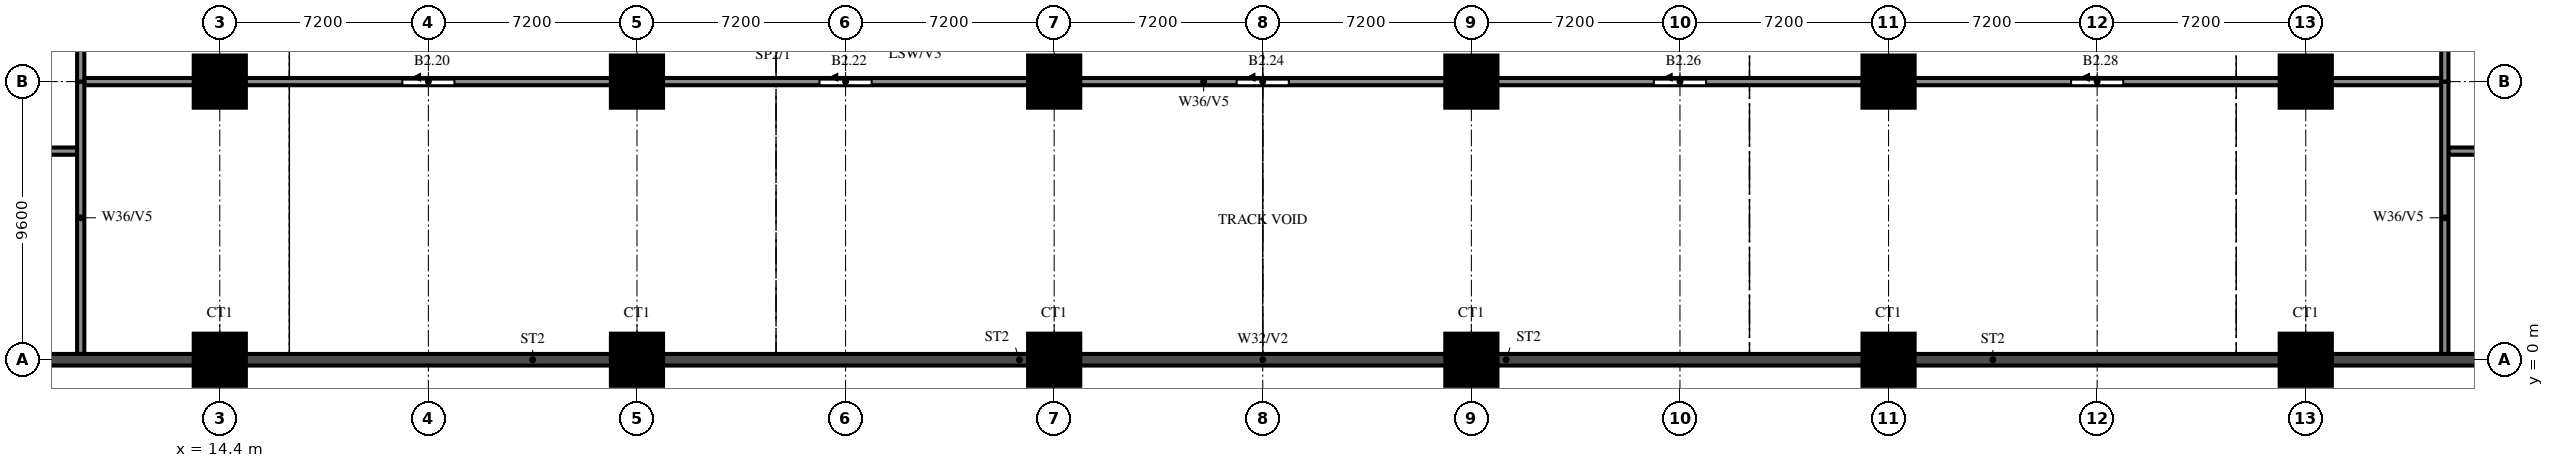
"""IFC4 building model, lengths in metres.
Left out: names, types, materials, properties, quantities, classifications, styles, units other than length and angle.
Written with IfcOpenShell. Run it as: python <this file> out.ifc"""

import sys

from ifc_helpers import new_model, si_unit, direction, frame, frame_2d, origin, origin_2d, place, context, subcontext, project, spatial, rectangle, extrude, source, transform, mapped, element, fill, save


model = new_model("IFC4")
c1 = context("Model", 3, precision=1e-05, world=origin(), true_north=direction((0.0, 1.0)))
c2 = subcontext(c1, "Body", "Model", "MODEL_VIEW")
j1 = project(units=[si_unit("LENGTHUNIT", "METRE"), si_unit("PLANEANGLEUNIT", "RADIAN")], contexts=[c1])
p1 = place(None, origin())
s1 = spatial("IfcSite", under=j1, at=p1, CompositionType="ELEMENT")
p2 = place(p1, origin())
s2 = spatial("IfcBuilding", under=s1, at=p2, CompositionType="ELEMENT")
p3 = place(p2, frame((0.0, 0.0, -11.4)))
s3 = spatial("IfcBuildingStorey", under=s2, at=p3, CompositionType="ELEMENT", Elevation=-11.4)
m1 = source(origin(), c2, "Body", "SweptSolid", [
    extrude(rectangle(XDim=1.8, YDim=1.8, at=origin_2d()), origin(), (0.0, 0.0, 1.0), 5.6),
])
for number, where, z_axis, x_axis in (
    (1, (14.4, 0.0, 0.0), (0.0, 0.0, 1.0), (1.0, 0.0, 0.0)),
    (2, (28.8, 0.0, 0.0), (0.0, 0.0, 1.0), (1.0, 0.0, 0.0)),
    (3, (43.2, 0.0, 0.0), (0.0, 0.0, 1.0), (1.0, 0.0, 0.0)),
    (4, (57.6, 0.0, 0.0), (0.0, 0.0, 1.0), (1.0, 0.0, 0.0)),
    (5, (72.0, 0.0, 0.0), (0.0, 0.0, 1.0), (1.0, 0.0, 0.0)),
    (6, (86.4, 0.0, 0.0), (0.0, 0.0, 1.0), (1.0, 0.0, 0.0)),
    (7, (14.4, 9.6, 0.0), (0.0, 0.0, 1.0), (1.0, 0.0, 0.0)),
    (8, (28.8, 9.6, 0.0), (0.0, 0.0, 1.0), (1.0, 0.0, 0.0)),
    (9, (43.2, 9.6, 0.0), (0.0, 0.0, 1.0), (1.0, 0.0, 0.0)),
    (10, (57.6, 9.6, 0.0), (0.0, 0.0, 1.0), (1.0, 0.0, 0.0)),
    (11, (72.0, 9.6, 0.0), (0.0, 0.0, 1.0), (1.0, 0.0, 0.0)),
    (12, (86.4, 9.6, 0.0), (0.0, 0.0, 1.0), (1.0, 0.0, 0.0)),
):
    element("IfcColumn", number, at=place(p3, frame(where, z_axis=z_axis, x_axis=x_axis)), inside=s3, PredefinedType="COLUMN", context=c2, shape_type="MappedRepresentation", body=[
        mapped(m1, transform((0.0, 0.0, 0.0))),
    ])
p4 = place(p3, frame((3.65, 0.0, 0.0), z_axis=(0.0, 0.0, 1.0), x_axis=(1.0, 0.0, 0.0)))
e13 = element("IfcWall", 13, at=p4, inside=s3, PredefinedType="SOLIDWALL", context=c2, shape_type="SweptSolid", body=[
    extrude(rectangle(XDim=93.5, YDim=0.4, at=frame_2d((46.75, 0.0))), origin(), (0.0, 0.0, 1.0), 5.6),
])
p5 = place(p3, frame((3.75, 7.2, 0.0), z_axis=(0.0, 0.0, 1.0), x_axis=(1.0, 0.0, 0.0)))
e14 = element("IfcWall", 14, at=p5, inside=s3, PredefinedType="SOLIDWALL", context=c2, shape_type="SweptSolid", body=[
    extrude(rectangle(XDim=5.725, YDim=0.25, at=frame_2d((2.863, 0.0))), origin(), (0.0, 0.0, 1.0), 5.6),
])
p6 = place(p5, frame((2.375, 0.0, 0.0)))
e15 = element("IfcOpeningElement", 15, at=p6, cuts=e14, PredefinedType="OPENING", context=c2, shape_type="SweptSolid", body=[
    extrude(rectangle(XDim=1.0, YDim=2.1, at=frame_2d((0.5, 1.05))), frame((0.0, 0.135, 0.0), z_axis=(0.0, -1.0, 0.0), x_axis=(1.0, 0.0, 0.0)), (0.0, 0.0, 1.0), 0.27),
])
p7 = place(p3, frame((91.325, 7.2, 0.0), z_axis=(0.0, 0.0, 1.0), x_axis=(1.0, 0.0, 0.0)))
e16 = element("IfcWall", 16, at=p7, inside=s3, PredefinedType="SOLIDWALL", context=c2, shape_type="SweptSolid", body=[
    extrude(rectangle(XDim=5.725, YDim=0.25, at=frame_2d((2.863, 0.0))), origin(), (0.0, 0.0, 1.0), 5.6),
])
p8 = place(p7, frame((2.35, 0.0, 0.0)))
e17 = element("IfcOpeningElement", 17, at=p8, cuts=e16, PredefinedType="OPENING", context=c2, shape_type="SweptSolid", body=[
    extrude(rectangle(XDim=1.0, YDim=2.1, at=frame_2d((0.5, 1.05))), frame((0.0, 0.135, 0.0), z_axis=(0.0, -1.0, 0.0), x_axis=(1.0, 0.0, 0.0)), (0.0, 0.0, 1.0), 0.27),
])
p9 = place(p3, frame((9.6, 9.6, 0.0), z_axis=(0.0, 0.0, 1.0), x_axis=(1.0, 0.0, 0.0)))
e18 = element("IfcWall", 18, at=p9, inside=s3, PredefinedType="SOLIDWALL", context=c2, shape_type="SweptSolid", body=[
    extrude(rectangle(XDim=81.6, YDim=0.25, at=frame_2d((40.8, 0.0))), origin(), (0.0, 0.0, 1.0), 2.2),
])
p10 = place(p9, frame((11.1, 0.0, 0.0)))
e19 = element("IfcOpeningElement", 19, at=p10, cuts=e18, PredefinedType="OPENING", context=c2, shape_type="SweptSolid", body=[
    extrude(rectangle(XDim=1.8, YDim=2.1, at=frame_2d((0.9, 1.05))), frame((0.0, 0.135, 0.0), z_axis=(0.0, -1.0, 0.0), x_axis=(1.0, 0.0, 0.0)), (0.0, 0.0, 1.0), 0.27),
])
p11 = place(p9, frame((25.5, 0.0, 0.0)))
e20 = element("IfcOpeningElement", 20, at=p11, cuts=e18, PredefinedType="OPENING", context=c2, shape_type="SweptSolid", body=[
    extrude(rectangle(XDim=1.8, YDim=2.1, at=frame_2d((0.9, 1.05))), frame((0.0, 0.135, 0.0), z_axis=(0.0, -1.0, 0.0), x_axis=(1.0, 0.0, 0.0)), (0.0, 0.0, 1.0), 0.27),
])
p12 = place(p9, frame((39.9, 0.0, 0.0)))
e21 = element("IfcOpeningElement", 21, at=p12, cuts=e18, PredefinedType="OPENING", context=c2, shape_type="SweptSolid", body=[
    extrude(rectangle(XDim=1.8, YDim=2.1, at=frame_2d((0.9, 1.05))), frame((0.0, 0.135, 0.0), z_axis=(0.0, -1.0, 0.0), x_axis=(1.0, 0.0, 0.0)), (0.0, 0.0, 1.0), 0.27),
])
p13 = place(p9, frame((54.3, 0.0, 0.0)))
e22 = element("IfcOpeningElement", 22, at=p13, cuts=e18, PredefinedType="OPENING", context=c2, shape_type="SweptSolid", body=[
    extrude(rectangle(XDim=1.8, YDim=2.1, at=frame_2d((0.9, 1.05))), frame((0.0, 0.135, 0.0), z_axis=(0.0, -1.0, 0.0), x_axis=(1.0, 0.0, 0.0)), (0.0, 0.0, 1.0), 0.27),
])
p14 = place(p9, frame((68.7, 0.0, 0.0)))
e23 = element("IfcOpeningElement", 23, at=p14, cuts=e18, PredefinedType="OPENING", context=c2, shape_type="SweptSolid", body=[
    extrude(rectangle(XDim=1.8, YDim=2.1, at=frame_2d((0.9, 1.05))), frame((0.0, 0.135, 0.0), z_axis=(0.0, -1.0, 0.0), x_axis=(1.0, 0.0, 0.0)), (0.0, 0.0, 1.0), 0.27),
])
p15 = place(p3, frame((9.6, 0.2, 0.0), z_axis=(0.0, 0.0, 1.0), x_axis=(0.0, 1.0, 0.0)))
e24 = element("IfcWall", 24, at=p15, inside=s3, PredefinedType="SOLIDWALL", context=c2, shape_type="SweptSolid", body=[
    extrude(rectangle(XDim=9.4, YDim=0.25, at=frame_2d((4.7, 0.0))), origin(), (0.0, 0.0, 1.0), 2.2),
])
p16 = place(p3, frame((9.6, 9.6, 0.0), z_axis=(0.0, 0.0, 1.0), x_axis=(0.0, 1.0, 0.0)))
e25 = element("IfcWall", 25, at=p16, inside=s3, PredefinedType="SOLIDWALL", context=c2, shape_type="SweptSolid", body=[
    extrude(rectangle(XDim=9.6, YDim=0.25, at=frame_2d((4.8, 0.0))), origin(), (0.0, 0.0, 1.0), 2.2),
])
p17 = place(p16, frame((3.9, 0.0, 0.0)))
e26 = element("IfcOpeningElement", 26, at=p17, cuts=e25, PredefinedType="OPENING", context=c2, shape_type="SweptSolid", body=[
    extrude(rectangle(XDim=1.8, YDim=2.1, at=frame_2d((0.9, 1.05))), frame((0.0, 0.135, 0.0), z_axis=(0.0, -1.0, 0.0), x_axis=(1.0, 0.0, 0.0)), (0.0, 0.0, 1.0), 0.27),
])
p18 = place(p3, frame((91.2, 0.2, 0.0), z_axis=(0.0, 0.0, 1.0), x_axis=(0.0, 1.0, 0.0)))
e27 = element("IfcWall", 27, at=p18, inside=s3, PredefinedType="SOLIDWALL", context=c2, shape_type="SweptSolid", body=[
    extrude(rectangle(XDim=9.4, YDim=0.25, at=frame_2d((4.7, 0.0))), origin(), (0.0, 0.0, 1.0), 2.2),
])
p19 = place(p3, frame((91.2, 9.6, 0.0), z_axis=(0.0, 0.0, 1.0), x_axis=(0.0, 1.0, 0.0)))
e28 = element("IfcWall", 28, at=p19, inside=s3, PredefinedType="SOLIDWALL", context=c2, shape_type="SweptSolid", body=[
    extrude(rectangle(XDim=9.6, YDim=0.25, at=frame_2d((4.8, 0.0))), origin(), (0.0, 0.0, 1.0), 2.2),
])
p20 = place(p19, frame((3.9, 0.0, 0.0)))
e29 = element("IfcOpeningElement", 29, at=p20, cuts=e28, PredefinedType="OPENING", context=c2, shape_type="SweptSolid", body=[
    extrude(rectangle(XDim=1.8, YDim=2.1, at=frame_2d((0.9, 1.05))), frame((0.0, 0.135, 0.0), z_axis=(0.0, -1.0, 0.0), x_axis=(1.0, 0.0, 0.0)), (0.0, 0.0, 1.0), 0.27),
])
p21 = place(p10, origin())
e30 = element("IfcDoor", 30, at=p21, inside=s3, OperationType="SLIDING_TO_LEFT", PredefinedType="DOOR", context=c2, shape_type="SweptSolid", body=[
    extrude(rectangle(XDim=1.8, YDim=2.1, at=frame_2d((0.9, 1.05))), frame((0.0, 0.025, 0.0), z_axis=(0.0, -1.0, 0.0), x_axis=(1.0, 0.0, 0.0)), (0.0, 0.0, 1.0), 0.05),
])
fill(e19, e30)
p22 = place(p11, origin())
e31 = element("IfcDoor", 31, at=p22, inside=s3, OperationType="SLIDING_TO_LEFT", PredefinedType="DOOR", context=c2, shape_type="SweptSolid", body=[
    extrude(rectangle(XDim=1.8, YDim=2.1, at=frame_2d((0.9, 1.05))), frame((0.0, 0.025, 0.0), z_axis=(0.0, -1.0, 0.0), x_axis=(1.0, 0.0, 0.0)), (0.0, 0.0, 1.0), 0.05),
])
fill(e20, e31)
p23 = place(p12, origin())
e32 = element("IfcDoor", 32, at=p23, inside=s3, OperationType="SLIDING_TO_LEFT", PredefinedType="DOOR", context=c2, shape_type="SweptSolid", body=[
    extrude(rectangle(XDim=1.8, YDim=2.1, at=frame_2d((0.9, 1.05))), frame((0.0, 0.025, 0.0), z_axis=(0.0, -1.0, 0.0), x_axis=(1.0, 0.0, 0.0)), (0.0, 0.0, 1.0), 0.05),
])
fill(e21, e32)
p24 = place(p13, origin())
e33 = element("IfcDoor", 33, at=p24, inside=s3, OperationType="SLIDING_TO_LEFT", PredefinedType="DOOR", context=c2, shape_type="SweptSolid", body=[
    extrude(rectangle(XDim=1.8, YDim=2.1, at=frame_2d((0.9, 1.05))), frame((0.0, 0.025, 0.0), z_axis=(0.0, -1.0, 0.0), x_axis=(1.0, 0.0, 0.0)), (0.0, 0.0, 1.0), 0.05),
])
fill(e22, e33)
p25 = place(p14, origin())
e34 = element("IfcDoor", 34, at=p25, inside=s3, OperationType="SLIDING_TO_LEFT", PredefinedType="DOOR", context=c2, shape_type="SweptSolid", body=[
    extrude(rectangle(XDim=1.8, YDim=2.1, at=frame_2d((0.9, 1.05))), frame((0.0, 0.025, 0.0), z_axis=(0.0, -1.0, 0.0), x_axis=(1.0, 0.0, 0.0)), (0.0, 0.0, 1.0), 0.05),
])
fill(e23, e34)
save(model, sys.argv[1])
